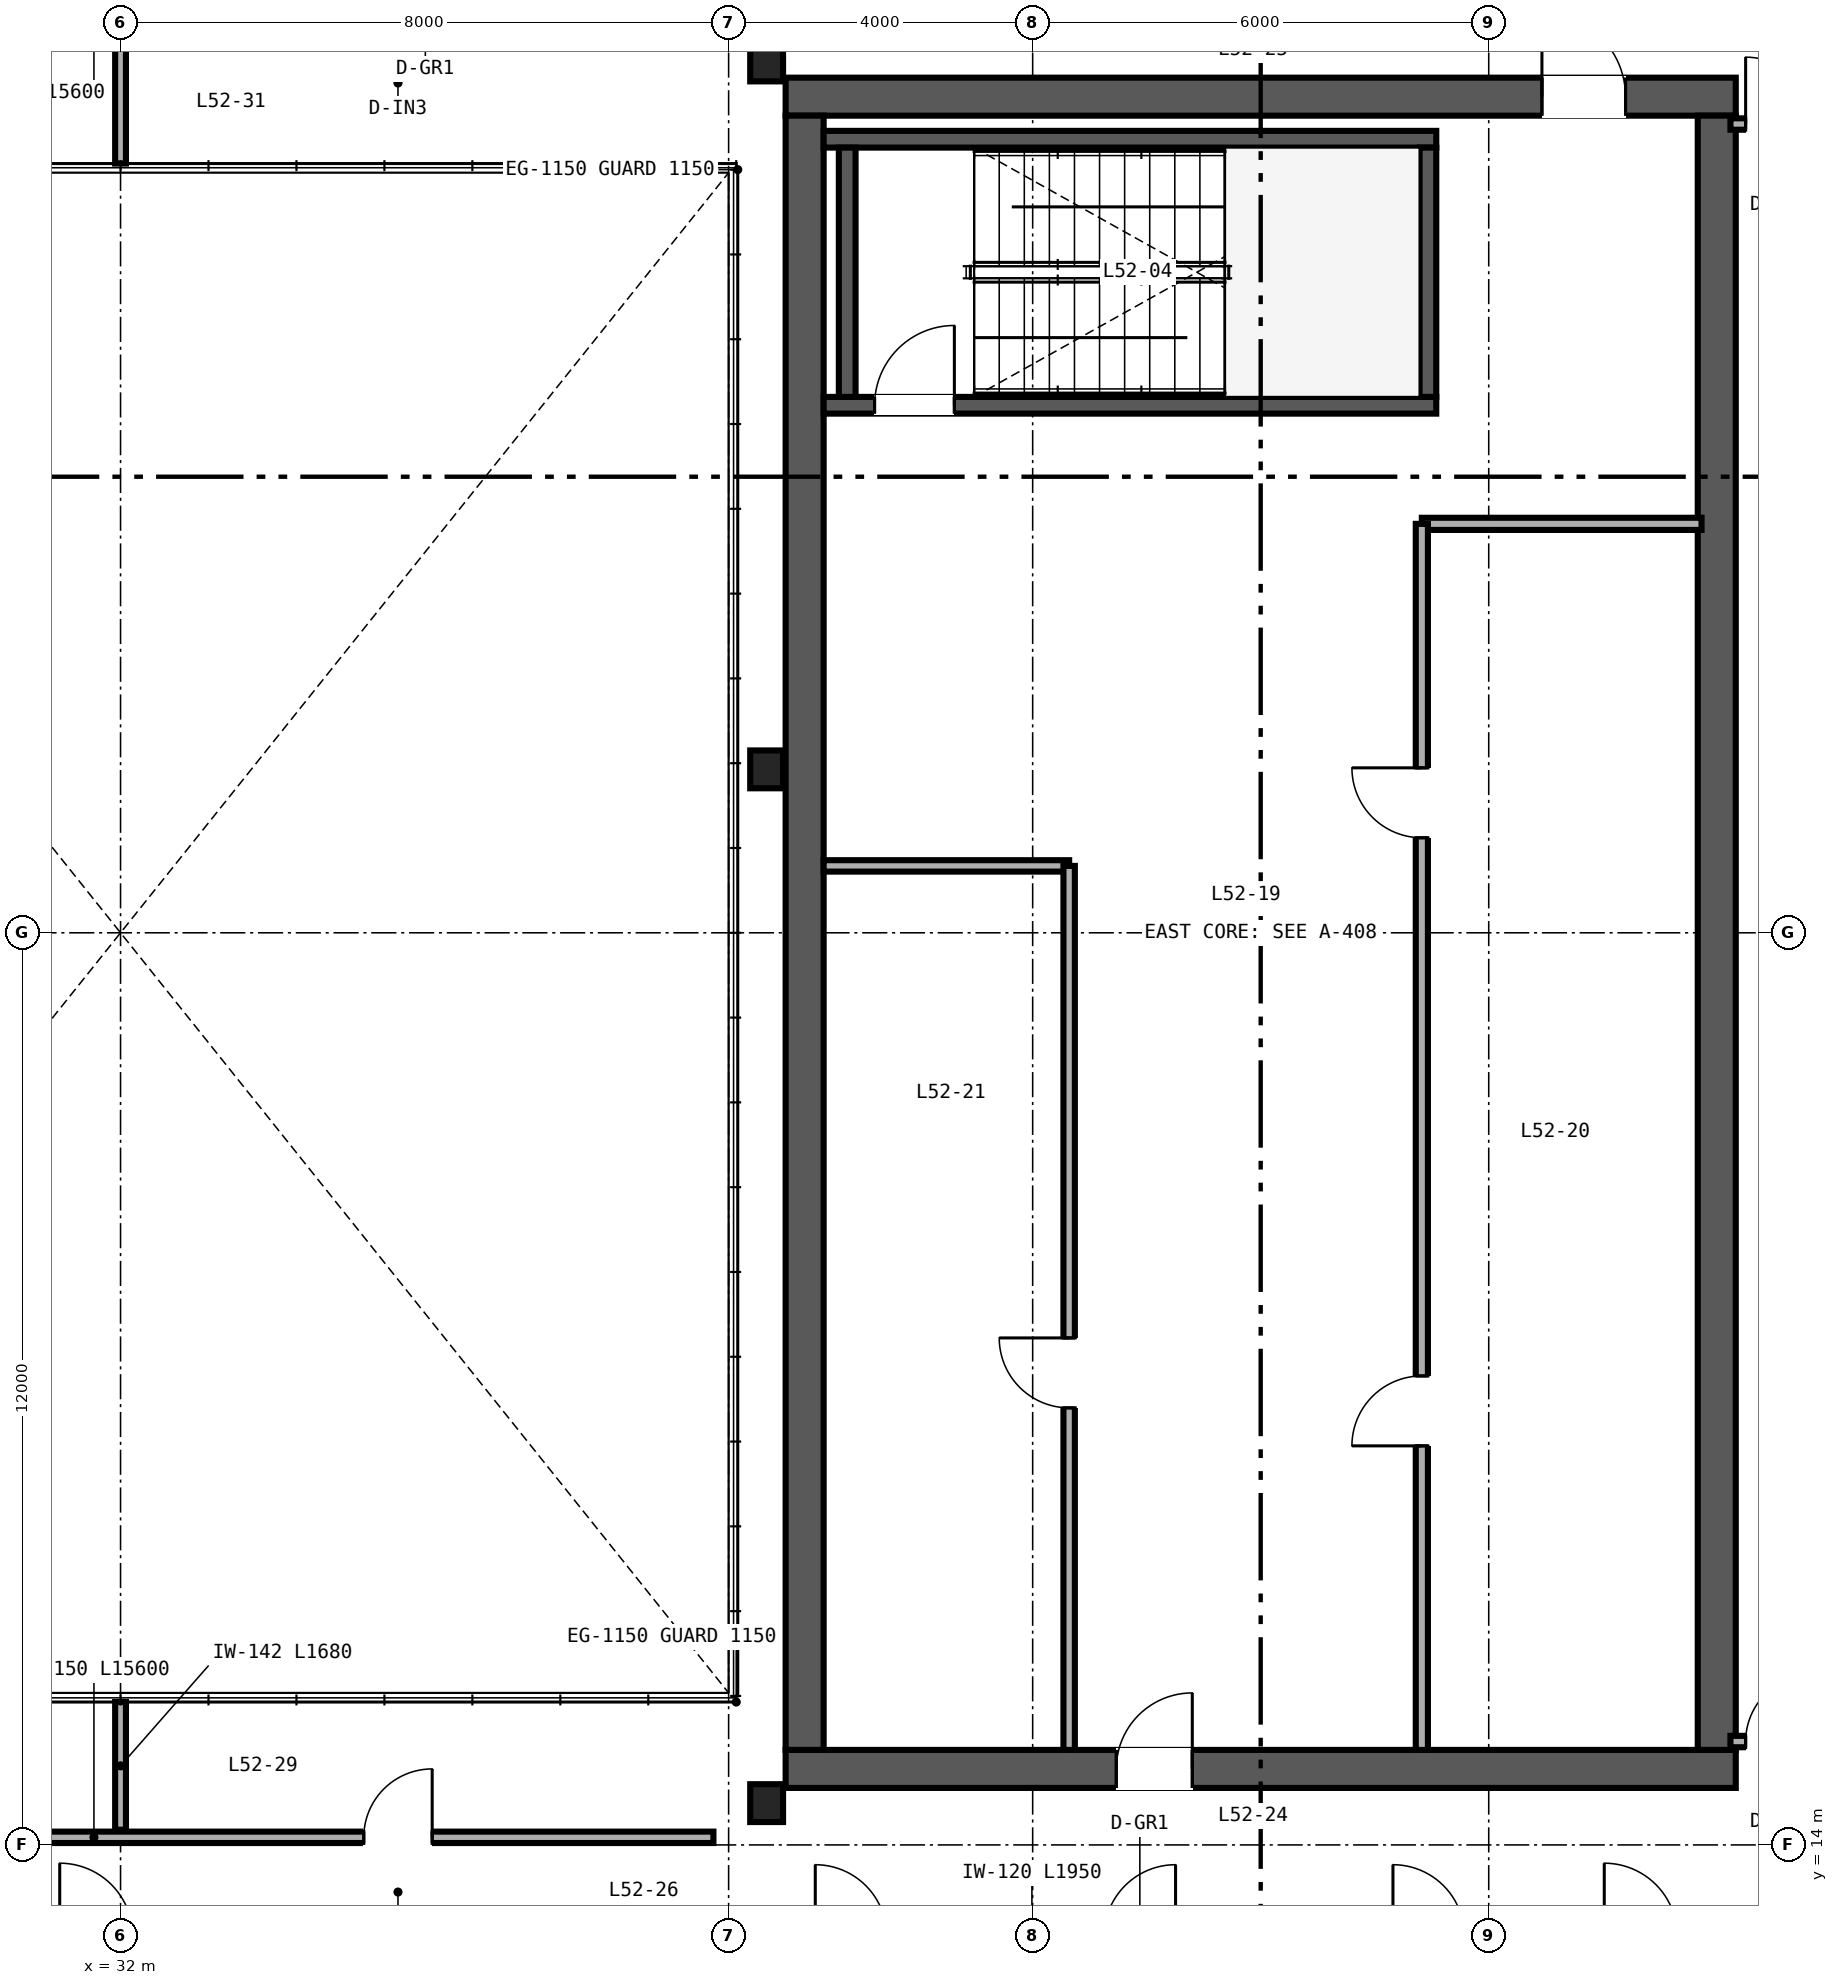
"""IFC4 building model, lengths in metres.
Left out: names, types, materials, properties, quantities, classifications, styles, units other than length and angle.
Written with IfcOpenShell. Run it as: python <this file> out.ifc"""

import sys

from ifc_helpers import new_model, si_unit, direction, frame, frame_2d, origin, origin_2d, place, context, subcontext, project, spatial, rectangle, i_section, extrude, source, transform, mapped, element, fill, save


model = new_model("IFC4")
c1 = context("Model", 3, precision=1e-05, world=origin(), true_north=direction((0.0, 1.0)))
c2 = subcontext(c1, "Body", "Model", "MODEL_VIEW")
j1 = project(units=[si_unit("LENGTHUNIT", "METRE"), si_unit("PLANEANGLEUNIT", "RADIAN")], contexts=[c1])
p1 = place(None, origin())
s1 = spatial("IfcSite", under=j1, at=p1, CompositionType="ELEMENT")
p2 = place(p1, origin())
s2 = spatial("IfcBuilding", under=s1, at=p2, CompositionType="ELEMENT")
p3 = place(p2, frame((0.0, 0.0, 206.4)))
s3 = spatial("IfcBuildingStorey", under=s2, at=p3, CompositionType="ELEMENT", Elevation=206.4)
p4 = place(p3, frame((40.75, 15.0, 0.0), z_axis=(0.0, 0.0, 1.0), x_axis=(1.0, 0.0, 0.0)))
e1 = element("IfcWall", 1, at=p4, inside=s3, PredefinedType="SHEAR", context=c2, shape_type="SweptSolid", body=[
    extrude(rectangle(XDim=12.5, YDim=0.5, at=frame_2d((6.25, 0.0))), origin(), (0.0, 0.0, 1.0), 3.37),
])
p5 = place(p4, frame((4.35, 0.0, 0.0)))
e2 = element("IfcOpeningElement", 2, at=p5, cuts=e1, PredefinedType="OPENING", context=c2, shape_type="SweptSolid", body=[
    extrude(rectangle(XDim=1.0, YDim=2.15, at=frame_2d((0.5, 1.075))), frame((0.0, 0.26, 0.0), z_axis=(0.0, -1.0, 0.0), x_axis=(1.0, 0.0, 0.0)), (0.0, 0.0, 1.0), 0.52),
])
p6 = place(p3, frame((40.75, 37.0, 0.0), z_axis=(0.0, 0.0, 1.0), x_axis=(1.0, 0.0, 0.0)))
e3 = element("IfcWall", 3, at=p6, inside=s3, PredefinedType="SHEAR", context=c2, shape_type="SweptSolid", body=[
    extrude(rectangle(XDim=12.5, YDim=0.5, at=frame_2d((6.25, 0.0))), origin(), (0.0, 0.0, 1.0), 3.37),
])
p7 = place(p6, frame((9.95, 0.0, 0.0)))
e4 = element("IfcOpeningElement", 4, at=p7, cuts=e3, PredefinedType="OPENING", context=c2, shape_type="SweptSolid", body=[
    extrude(rectangle(XDim=1.1, YDim=2.15, at=frame_2d((0.55, 1.075))), frame((0.0, 0.26, 0.0), z_axis=(0.0, -1.0, 0.0), x_axis=(1.0, 0.0, 0.0)), (0.0, 0.0, 1.0), 0.52),
])
for number, where, z_axis, x_axis in (
    (5, (41.0, 15.25, 0.0), (0.0, 0.0, 1.0), (0.0, 1.0, 0.0)),
    (6, (53.0, 15.25, 0.0), (0.0, 0.0, 1.0), (0.0, 1.0, 0.0)),
):
    element("IfcWall", number, at=place(p3, frame(where, z_axis=z_axis, x_axis=x_axis)), inside=s3, PredefinedType="SHEAR", context=c2, shape_type="SweptSolid", body=[
        extrude(rectangle(XDim=21.5, YDim=0.5, at=frame_2d((10.75, 0.0))), origin(), (0.0, 0.0, 1.0), 3.37),
    ])
p8 = place(p3, frame((41.25, 32.94, 0.0), z_axis=(0.0, 0.0, 1.0), x_axis=(1.0, 0.0, 0.0)))
e7 = element("IfcWall", 7, at=p8, inside=s3, PredefinedType="SHEAR", context=c2, shape_type="SweptSolid", body=[
    extrude(rectangle(XDim=8.06, YDim=0.22, at=frame_2d((4.03, 0.0))), origin(), (0.0, 0.0, 1.0), 3.4),
])
p9 = place(p8, frame((0.67, 0.0, 0.0)))
e8 = element("IfcOpeningElement", 8, at=p9, cuts=e7, PredefinedType="OPENING", context=c2, shape_type="SweptSolid", body=[
    extrude(rectangle(XDim=1.05, YDim=2.15, at=frame_2d((0.525, 1.075))), frame((0.0, 0.12, 0.0), z_axis=(0.0, -1.0, 0.0), x_axis=(1.0, 0.0, 0.0)), (0.0, 0.0, 1.0), 0.24),
])
p10 = place(p3, frame((41.25, 36.44, 0.0), z_axis=(0.0, 0.0, 1.0), x_axis=(1.0, 0.0, 0.0)))
e9 = element("IfcWall", 9, at=p10, inside=s3, PredefinedType="SHEAR", context=c2, shape_type="SweptSolid", body=[
    extrude(rectangle(XDim=8.06, YDim=0.22, at=frame_2d((4.03, 0.0))), origin(), (0.0, 0.0, 1.0), 3.4),
])
for number, where, z_axis, x_axis in (
    (10, (41.56, 33.05, 0.0), (0.0, 0.0, 1.0), (0.0, 1.0, 0.0)),
    (11, (49.2, 33.05, 0.0), (0.0, 0.0, 1.0), (0.0, 1.0, 0.0)),
):
    element("IfcWall", number, at=place(p3, frame(where, z_axis=z_axis, x_axis=x_axis)), inside=s3, PredefinedType="SHEAR", context=c2, shape_type="SweptSolid", body=[
        extrude(rectangle(XDim=3.28, YDim=0.22, at=frame_2d((1.64, 0.0))), origin(), (0.0, 0.0, 1.0), 3.4),
    ])
m1 = source(origin(), c2, "Body", "SweptSolid", [
    extrude(i_section(OverallWidth=0.432, OverallDepth=0.498, WebThickness=0.056, FlangeThickness=0.089, FilletRadius=0.025, at=origin_2d()), origin(), (0.0, 0.0, 1.0), 3.37),
])
for number, where, z_axis, x_axis in (
    (12, (40.5, 14.55, 0.0), (0.0, 0.0, 1.0), (1.0, 0.0, 0.0)),
    (13, (40.5, 28.15, 0.0), (0.0, 0.0, 1.0), (1.0, 0.0, 0.0)),
    (14, (40.5, 37.45, 0.0), (0.0, 0.0, 1.0), (1.0, 0.0, 0.0)),
):
    element("IfcColumn", number, at=place(p3, frame(where, z_axis=z_axis, x_axis=x_axis)), inside=s3, PredefinedType="COLUMN", context=c2, shape_type="MappedRepresentation", body=[
        mapped(m1, transform((0.0, 0.0, 0.0), scale=1.0)),
    ])
p11 = place(p3, frame((49.12, 31.38, 0.0), z_axis=(0.0, 0.0, 1.0), x_axis=(1.0, 0.0, 0.0)))
e15 = element("IfcWall", 15, at=p11, inside=s3, PredefinedType="PARTITIONING", context=c2, shape_type="SweptSolid", body=[
    extrude(rectangle(XDim=3.68, YDim=0.16, at=frame_2d((1.84, 0.0))), origin(), (0.0, 0.0, 1.0), 2.47),
])
p12 = place(p3, frame((49.12, 15.25, 0.0), z_axis=(0.0, 0.0, 1.0), x_axis=(0.0, 1.0, 0.0)))
e16 = element("IfcWall", 16, at=p12, inside=s3, PredefinedType="PARTITIONING", context=c2, shape_type="SweptSolid", body=[
    extrude(rectangle(XDim=16.13, YDim=0.16, at=frame_2d((8.065, 0.0))), origin(), (0.0, 0.0, 1.0), 2.443),
])
p13 = place(p12, frame((4.0, 0.0, 0.0)))
e17 = element("IfcOpeningElement", 17, at=p13, cuts=e16, PredefinedType="OPENING", context=c2, shape_type="SweptSolid", body=[
    extrude(rectangle(XDim=0.92, YDim=2.15, at=frame_2d((0.46, 1.075))), frame((0.0, 0.09, 0.0), z_axis=(0.0, -1.0, 0.0), x_axis=(1.0, 0.0, 0.0)), (0.0, 0.0, 1.0), 0.18),
])
p14 = place(p12, frame((12.0, 0.0, 0.0)))
e18 = element("IfcOpeningElement", 18, at=p14, cuts=e16, PredefinedType="OPENING", context=c2, shape_type="SweptSolid", body=[
    extrude(rectangle(XDim=0.92, YDim=2.15, at=frame_2d((0.46, 1.075))), frame((0.0, 0.09, 0.0), z_axis=(0.0, -1.0, 0.0), x_axis=(1.0, 0.0, 0.0)), (0.0, 0.0, 1.0), 0.18),
])
p15 = place(p3, frame((41.25, 26.88, 0.0), z_axis=(0.0, 0.0, 1.0), x_axis=(1.0, 0.0, 0.0)))
e19 = element("IfcWall", 19, at=p15, inside=s3, PredefinedType="PARTITIONING", context=c2, shape_type="SweptSolid", body=[
    extrude(rectangle(XDim=3.23, YDim=0.15, at=frame_2d((1.615, 0.0))), origin(), (0.0, 0.0, 1.0), 3.37),
])
p16 = place(p3, frame((44.48, 15.25, 0.0), z_axis=(0.0, 0.0, 1.0), x_axis=(0.0, 1.0, 0.0)))
e20 = element("IfcWall", 20, at=p16, inside=s3, PredefinedType="PARTITIONING", context=c2, shape_type="SweptSolid", body=[
    extrude(rectangle(XDim=11.63, YDim=0.15, at=frame_2d((5.815, 0.0))), origin(), (0.0, 0.0, 1.0), 3.37),
])
p17 = place(p16, frame((4.5, 0.0, 0.0)))
e21 = element("IfcOpeningElement", 21, at=p17, cuts=e20, PredefinedType="OPENING", context=c2, shape_type="SweptSolid", body=[
    extrude(rectangle(XDim=0.92, YDim=2.15, at=frame_2d((0.46, 1.075))), frame((0.0, 0.085, 0.0), z_axis=(0.0, -1.0, 0.0), x_axis=(1.0, 0.0, 0.0)), (0.0, 0.0, 1.0), 0.17),
])
p18 = place(p3, frame((24.2, 14.1, 0.0), z_axis=(0.0, 0.0, 1.0), x_axis=(1.0, 0.0, 0.0)))
e22 = element("IfcWall", 22, at=p18, inside=s3, PredefinedType="PARTITIONING", context=c2, shape_type="SweptSolid", body=[
    extrude(rectangle(XDim=15.6, YDim=0.15, at=frame_2d((7.8, 0.0))), origin(), (0.0, 0.0, 1.0), 3.37),
])
p19 = place(p18, frame((3.0, 0.0, 0.0)))
e23 = element("IfcOpeningElement", 23, at=p19, cuts=e22, PredefinedType="OPENING", context=c2, shape_type="SweptSolid", body=[
    extrude(rectangle(XDim=0.9, YDim=2.15, at=frame_2d((0.45, 1.075))), frame((0.0, 0.085, 0.0), z_axis=(0.0, -1.0, 0.0), x_axis=(1.0, 0.0, 0.0)), (0.0, 0.0, 1.0), 0.17),
])
p20 = place(p18, frame((11.0, 0.0, 0.0)))
e24 = element("IfcOpeningElement", 24, at=p20, cuts=e22, PredefinedType="OPENING", context=c2, shape_type="SweptSolid", body=[
    extrude(rectangle(XDim=0.9, YDim=2.15, at=frame_2d((0.45, 1.075))), frame((0.0, 0.085, 0.0), z_axis=(0.0, -1.0, 0.0), x_axis=(1.0, 0.0, 0.0)), (0.0, 0.0, 1.0), 0.17),
])
for number, where, z_axis, x_axis in (
    (25, (32.0, 14.2, 0.0), (0.0, 0.0, 1.0), (0.0, 1.0, 0.0)),
    (26, (32.0, 36.12, 0.0), (0.0, 0.0, 1.0), (0.0, 1.0, 0.0)),
):
    element("IfcWall", number, at=place(p3, frame(where, z_axis=z_axis, x_axis=x_axis)), inside=s3, PredefinedType="PARTITIONING", context=c2, shape_type="SweptSolid", body=[
        extrude(rectangle(XDim=1.68, YDim=0.142, at=frame_2d((0.84, 0.0))), origin(), (0.0, 0.0, 1.0), 3.37),
    ])
p21 = place(p3, frame((53.18, 15.36, 0.0), z_axis=(0.0, 0.0, 1.0), x_axis=(1.0, 0.0, 0.0)))
e27 = element("IfcWall", 27, at=p21, inside=s3, PredefinedType="PARTITIONING", context=c2, shape_type="SweptSolid", body=[
    extrude(rectangle(XDim=2.66, YDim=0.15, at=frame_2d((1.33, 0.0))), origin(), (0.0, 0.0, 1.0), 2.591),
])
p22 = place(p21, frame((0.2, 0.0, 0.0)))
e28 = element("IfcOpeningElement", 28, at=p22, cuts=e27, PredefinedType="OPENING", context=c2, shape_type="SweptSolid", body=[
    extrude(rectangle(XDim=0.88, YDim=2.15, at=frame_2d((0.44, 1.075))), frame((0.0, 0.085, 0.0), z_axis=(0.0, -1.0, 0.0), x_axis=(1.0, 0.0, 0.0)), (0.0, 0.0, 1.0), 0.17),
])
p23 = place(p3, frame((53.18, 36.64, 0.0), z_axis=(0.0, 0.0, 1.0), x_axis=(1.0, 0.0, 0.0)))
e29 = element("IfcWall", 29, at=p23, inside=s3, PredefinedType="PARTITIONING", context=c2, shape_type="SweptSolid", body=[
    extrude(rectangle(XDim=2.66, YDim=0.15, at=frame_2d((1.33, 0.0))), origin(), (0.0, 0.0, 1.0), 2.753),
])
p24 = place(p23, frame((0.2, 0.0, 0.0)))
e30 = element("IfcOpeningElement", 30, at=p24, cuts=e29, PredefinedType="OPENING", context=c2, shape_type="SweptSolid", body=[
    extrude(rectangle(XDim=0.88, YDim=2.15, at=frame_2d((0.44, 1.075))), frame((0.0, 0.085, 0.0), z_axis=(0.0, -1.0, 0.0), x_axis=(1.0, 0.0, 0.0)), (0.0, 0.0, 1.0), 0.17),
])
m2 = source(origin(), c2, "Body", "SweptSolid", [
    extrude(rectangle(XDim=1.05, YDim=2.15, at=frame_2d((0.525, 1.075))), frame((0.0, 0.025, 0.0), z_axis=(0.0, -1.0, 0.0), x_axis=(1.0, 0.0, 0.0)), (0.0, 0.0, 1.0), 0.05),
])
p25 = place(p9, origin())
e31 = element("IfcDoor", 31, at=p25, inside=s3, OperationType="SINGLE_SWING_RIGHT", PredefinedType="DOOR", context=c2, shape_type="MappedRepresentation", body=[
    mapped(m2, transform((0.0, 0.0, 0.0), scale=1.0)),
])
fill(e8, e31)
m3 = source(origin(), c2, "Body", "SweptSolid", [
    extrude(rectangle(XDim=1.0, YDim=2.15, at=frame_2d((0.5, 1.075))), frame((0.0, 0.025, 0.0), z_axis=(0.0, -1.0, 0.0), x_axis=(1.0, 0.0, 0.0)), (0.0, 0.0, 1.0), 0.05),
])
p26 = place(p5, origin())
e32 = element("IfcDoor", 32, at=p26, inside=s3, OperationType="SINGLE_SWING_RIGHT", PredefinedType="DOOR", context=c2, shape_type="MappedRepresentation", body=[
    mapped(m3, transform((0.0, 0.0, 0.0), scale=1.0)),
])
fill(e2, e32)
m4 = source(origin(), c2, "Body", "SweptSolid", [
    extrude(rectangle(XDim=1.1, YDim=2.15, at=frame_2d((0.55, 1.075))), frame((0.0, 0.025, 0.0), z_axis=(0.0, -1.0, 0.0), x_axis=(1.0, 0.0, 0.0)), (0.0, 0.0, 1.0), 0.05),
])
p27 = place(p7, origin())
e33 = element("IfcDoor", 33, at=p27, inside=s3, OperationType="SINGLE_SWING_LEFT", PredefinedType="DOOR", context=c2, shape_type="MappedRepresentation", body=[
    mapped(m4, transform((0.0, 0.0, 0.0), scale=1.0)),
])
fill(e4, e33)
m5 = source(origin(), c2, "Body", "SweptSolid", [
    extrude(rectangle(XDim=0.92, YDim=2.15, at=frame_2d((0.46, 1.075))), frame((0.0, 0.025, 0.0), z_axis=(0.0, -1.0, 0.0), x_axis=(1.0, 0.0, 0.0)), (0.0, 0.0, 1.0), 0.05),
])
p28 = place(p13, origin())
e34 = element("IfcDoor", 34, at=p28, inside=s3, OperationType="SINGLE_SWING_LEFT", PredefinedType="DOOR", context=c2, shape_type="MappedRepresentation", body=[
    mapped(m5, transform((0.0, 0.0, 0.0), scale=1.0)),
])
fill(e17, e34)
p29 = place(p14, origin())
e35 = element("IfcDoor", 35, at=p29, inside=s3, OperationType="SINGLE_SWING_RIGHT", PredefinedType="DOOR", context=c2, shape_type="MappedRepresentation", body=[
    mapped(m5, transform((0.0, 0.0, 0.0), scale=1.0)),
])
fill(e18, e35)
p30 = place(p17, origin())
e36 = element("IfcDoor", 36, at=p30, inside=s3, OperationType="SINGLE_SWING_RIGHT", PredefinedType="DOOR", context=c2, shape_type="MappedRepresentation", body=[
    mapped(m5, transform((0.0, 0.0, 0.0), scale=1.0)),
])
fill(e21, e36)
m6 = source(origin(), c2, "Body", "SweptSolid", [
    extrude(rectangle(XDim=0.9, YDim=2.15, at=frame_2d((0.45, 1.075))), frame((0.0, 0.025, 0.0), z_axis=(0.0, -1.0, 0.0), x_axis=(1.0, 0.0, 0.0)), (0.0, 0.0, 1.0), 0.05),
])
p31 = place(p20, origin())
e37 = element("IfcDoor", 37, at=p31, inside=s3, OperationType="SINGLE_SWING_RIGHT", PredefinedType="DOOR", context=c2, shape_type="MappedRepresentation", body=[
    mapped(m6, transform((0.0, 0.0, 0.0), scale=1.0)),
])
fill(e24, e37)
m7 = source(origin(), c2, "Body", "SweptSolid", [
    extrude(rectangle(XDim=0.88, YDim=2.15, at=frame_2d((0.44, 1.075))), frame((0.0, 0.025, 0.0), z_axis=(0.0, -1.0, 0.0), x_axis=(1.0, 0.0, 0.0)), (0.0, 0.0, 1.0), 0.05),
])
p32 = place(p22, origin())
e38 = element("IfcDoor", 38, at=p32, inside=s3, OperationType="SINGLE_SWING_RIGHT", PredefinedType="DOOR", context=c2, shape_type="MappedRepresentation", body=[
    mapped(m7, transform((0.0, 0.0, 0.0), scale=1.0)),
])
fill(e28, e38)
p33 = place(p24, origin())
e39 = element("IfcDoor", 39, at=p33, inside=s3, OperationType="SINGLE_SWING_LEFT", PredefinedType="DOOR", context=c2, shape_type="MappedRepresentation", body=[
    mapped(m7, transform((0.0, 0.0, 0.0), scale=1.0)),
])
fill(e30, e39)
save(model, sys.argv[1])
